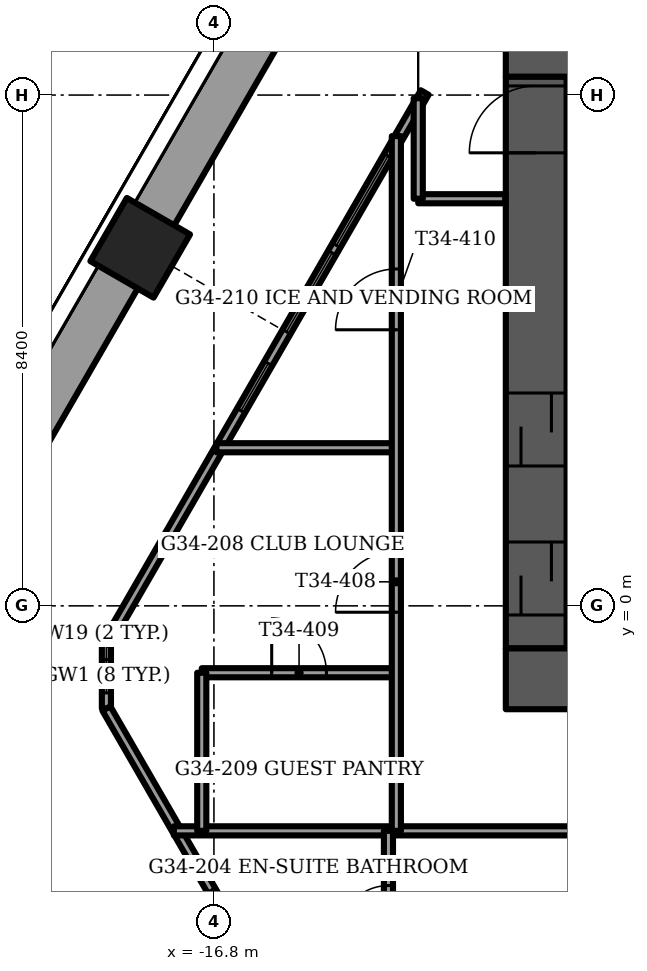
"""IFC4 building model, lengths in metres.
Left out: names, types, materials, properties, quantities, classifications, styles, units other than length and angle.
Written with IfcOpenShell. Run it as: python <this file> out.ifc"""

import sys

from ifc_helpers import new_model, si_unit, direction, frame, frame_2d, origin, origin_2d, place, context, subcontext, project, spatial, rectangle, extrude, element, fill, save


model = new_model("IFC4")
c1 = context("Model", 3, precision=1e-05, world=origin(), true_north=direction((0.0, 1.0)))
c2 = subcontext(c1, "Body", "Model", "MODEL_VIEW")
j1 = project(units=[si_unit("LENGTHUNIT", "METRE"), si_unit("PLANEANGLEUNIT", "RADIAN")], contexts=[c1])
p1 = place(None, origin())
s1 = spatial("IfcSite", under=j1, at=p1, CompositionType="ELEMENT")
p2 = place(p1, origin())
s2 = spatial("IfcBuilding", under=s1, at=p2, CompositionType="ELEMENT")
p3 = place(p2, frame((0.0, 0.0, 138.5)))
s3 = spatial("IfcBuildingStorey", under=s2, at=p3, CompositionType="ELEMENT", Elevation=138.5)
p4 = place(p3, frame((-18.012, 5.888, -1.2), z_axis=(0.0, 0.0, 1.0), x_axis=(0.5, 0.866025403784, 0.0)))
e1 = element("IfcColumn", 1, at=p4, inside=s3, PredefinedType="COLUMN", context=c2, shape_type="SweptSolid", body=[
    extrude(rectangle(XDim=1.2, YDim=1.2, at=origin_2d()), origin(), (0.0, 0.0, 1.0), 3.75),
])
p5 = place(p3, frame((-12.0, -1.2, -0.3), z_axis=(0.0, 0.0, 1.0), x_axis=(1.0, 0.0, 0.0)))
e2 = element("IfcWall", 2, at=p5, inside=s3, PredefinedType="SHEAR", context=c2, shape_type="SweptSolid", body=[
    extrude(rectangle(XDim=24.0, YDim=1.0, at=frame_2d((12.0, 0.0))), origin(), (0.0, 0.0, 1.0), 3.75),
])
p6 = place(p5, frame((11.2, 0.0, 0.0)))
e3 = element("IfcOpeningElement", 3, at=p6, cuts=e2, PredefinedType="OPENING", context=c2, shape_type="SweptSolid", body=[
    extrude(rectangle(XDim=1.6, YDim=2.1, at=frame_2d((0.8, 1.05))), frame((0.0, 0.5, 0.0), z_axis=(0.0, -1.0, 0.0), x_axis=(1.0, 0.0, 0.0)), (0.0, 0.0, 1.0), 1.0),
])
p7 = place(p3, frame((-12.0, 9.2, -0.3), z_axis=(0.0, 0.0, 1.0), x_axis=(1.0, 0.0, 0.0)))
e4 = element("IfcWall", 4, at=p7, inside=s3, PredefinedType="SHEAR", context=c2, shape_type="SweptSolid", body=[
    extrude(rectangle(XDim=24.0, YDim=1.0, at=frame_2d((12.0, 0.0))), origin(), (0.0, 0.0, 1.0), 3.75),
])
p8 = place(p7, frame((11.2, 0.0, 0.0)))
e5 = element("IfcOpeningElement", 5, at=p8, cuts=e4, PredefinedType="OPENING", context=c2, shape_type="SweptSolid", body=[
    extrude(rectangle(XDim=1.6, YDim=2.1, at=frame_2d((0.8, 1.05))), frame((0.0, 0.5, 0.0), z_axis=(0.0, -1.0, 0.0), x_axis=(1.0, 0.0, 0.0)), (0.0, 0.0, 1.0), 1.0),
])
p9 = place(p7, frame((5.25, 0.0, 0.0)))
e6 = element("IfcOpeningElement", 6, at=p9, cuts=e4, PredefinedType="OPENING", context=c2, shape_type="SweptSolid", body=[
    extrude(rectangle(XDim=1.1, YDim=2.1, at=frame_2d((0.55, 1.05))), frame((0.0, 0.5, 0.0), z_axis=(0.0, -1.0, 0.0), x_axis=(1.0, 0.0, 0.0)), (0.0, 0.0, 1.0), 1.0),
])
p10 = place(p7, frame((17.65, 0.0, 0.0)))
e7 = element("IfcOpeningElement", 7, at=p10, cuts=e4, PredefinedType="OPENING", context=c2, shape_type="SweptSolid", body=[
    extrude(rectangle(XDim=1.1, YDim=2.1, at=frame_2d((0.55, 1.05))), frame((0.0, 0.5, 0.0), z_axis=(0.0, -1.0, 0.0), x_axis=(1.0, 0.0, 0.0)), (0.0, 0.0, 1.0), 1.0),
])
p11 = place(p3, frame((-11.5, -0.7, -0.3), z_axis=(0.0, 0.0, 1.0), x_axis=(0.0, 1.0, 0.0)))
e8 = element("IfcWall", 8, at=p11, inside=s3, PredefinedType="SHEAR", context=c2, shape_type="SweptSolid", body=[
    extrude(rectangle(XDim=9.4, YDim=1.0, at=frame_2d((4.7, 0.0))), origin(), (0.0, 0.0, 1.0), 3.75),
])
p12 = place(p11, frame((8.15, 0.0, 0.0)))
e9 = element("IfcOpeningElement", 9, at=p12, cuts=e8, PredefinedType="OPENING", context=c2, shape_type="SweptSolid", body=[
    extrude(rectangle(XDim=1.1, YDim=2.1, at=frame_2d((0.55, 1.05))), frame((0.0, 0.5, 0.0), z_axis=(0.0, -1.0, 0.0), x_axis=(1.0, 0.0, 0.0)), (0.0, 0.0, 1.0), 1.0),
])
p13 = place(p11, frame((0.55, 0.0, 0.0)))
e10 = element("IfcOpeningElement", 10, at=p13, cuts=e8, PredefinedType="OPENING", context=c2, shape_type="SweptSolid", body=[
    extrude(rectangle(XDim=1.2, YDim=2.1, at=frame_2d((0.6, 1.05))), frame((0.0, 0.5, 0.0), z_axis=(0.0, -1.0, 0.0), x_axis=(1.0, 0.0, 0.0)), (0.0, 0.0, 1.0), 1.0),
])
p14 = place(p11, frame((3.0, 0.0, 0.0)))
e11 = element("IfcOpeningElement", 11, at=p14, cuts=e8, PredefinedType="OPENING", context=c2, shape_type="SweptSolid", body=[
    extrude(rectangle(XDim=1.2, YDim=2.1, at=frame_2d((0.6, 1.05))), frame((0.0, 0.5, 0.0), z_axis=(0.0, -1.0, 0.0), x_axis=(1.0, 0.0, 0.0)), (0.0, 0.0, 1.0), 1.0),
])
p15 = place(p3, frame((-14.521, 12.237, 0.0), z_axis=(0.0, 0.0, 1.0), x_axis=(-0.499983182885, -0.866035112932, 0.0)))
e12 = element("IfcWall", 12, at=p15, inside=s3, PredefinedType="PARAPET", context=c2, shape_type="SweptSolid", body=[
    extrude(rectangle(XDim=6.674, YDim=0.9, at=frame_2d((3.337, 0.0))), origin(), (0.0, 0.0, 1.0), 1.1),
])
p16 = place(p3, frame((-18.427, 5.47, 0.0), z_axis=(0.0, 0.0, 1.0), x_axis=(-0.499991127072, -0.866030526511, 0.0)))
e13 = element("IfcWall", 13, at=p16, inside=s3, PredefinedType="PARAPET", context=c2, shape_type="SweptSolid", body=[
    extrude(rectangle(XDim=7.001, YDim=0.9, at=frame_2d((3.5, 0.0))), origin(), (0.0, 0.0, 1.0), 1.1),
])
p17 = place(p3, frame((-21.928, -1.72, 0.0), z_axis=(0.0, 0.0, 1.0), x_axis=(0.500011423449, -0.866018808352, 0.0)))
e14 = element("IfcWall", 14, at=p17, inside=s3, PredefinedType="PARAPET", context=c2, shape_type="SweptSolid", body=[
    extrude(rectangle(XDim=4.998, YDim=0.9, at=frame_2d((2.499, 0.0))), origin(), (0.0, 0.0, 1.0), 1.1),
])
p18 = place(p3, frame((-13.334, 8.442, 0.0), z_axis=(0.0, 0.0, 1.0), x_axis=(-0.499994317138, -0.866028684761, 0.0)))
e15 = element("IfcWall", 15, at=p18, inside=s3, PredefinedType="SOLIDWALL", context=c2, shape_type="SweptSolid", body=[
    extrude(rectangle(XDim=10.468, YDim=0.15, at=frame_2d((5.234, 0.0))), origin(), (0.0, 0.0, 1.0), 3.45),
])
p19 = place(p18, frame((1.204, 0.0, 0.15)))
e16 = element("IfcOpeningElement", 16, at=p19, cuts=e15, PredefinedType="OPENING", context=c2, shape_type="SweptSolid", body=[
    extrude(rectangle(XDim=1.7, YDim=2.2, at=frame_2d((0.85, 1.1))), frame((0.0, 0.075, 0.0), z_axis=(0.0, -1.0, 0.0), x_axis=(1.0, 0.0, 0.0)), (0.0, 0.0, 1.0), 0.15),
])
p20 = place(p18, frame((3.044, 0.0, 0.15)))
e17 = element("IfcOpeningElement", 17, at=p20, cuts=e15, PredefinedType="OPENING", context=c2, shape_type="SweptSolid", body=[
    extrude(rectangle(XDim=1.5, YDim=2.2, at=frame_2d((0.75, 1.1))), frame((0.0, 0.075, 0.0), z_axis=(0.0, -1.0, 0.0), x_axis=(1.0, 0.0, 0.0)), (0.0, 0.0, 1.0), 0.15),
])
p21 = place(p18, frame((5.144, 0.0, 0.15)))
e18 = element("IfcOpeningElement", 18, at=p21, cuts=e15, PredefinedType="OPENING", context=c2, shape_type="SweptSolid", body=[
    extrude(rectangle(XDim=0.9, YDim=2.2, at=frame_2d((0.45, 1.1))), frame((0.0, 0.075, 0.0), z_axis=(0.0, -1.0, 0.0), x_axis=(1.0, 0.0, 0.0)), (0.0, 0.0, 1.0), 0.15),
])
p22 = place(p3, frame((-18.568, -1.689, 0.0), z_axis=(0.0, 0.0, 1.0), x_axis=(0.499994317138, -0.866028684761, 0.0)))
e19 = element("IfcWall", 19, at=p22, inside=s3, PredefinedType="SOLIDWALL", context=c2, shape_type="SweptSolid", body=[
    extrude(rectangle(XDim=10.468, YDim=0.15, at=frame_2d((5.234, 0.0))), origin(), (0.0, 0.0, 1.0), 3.45),
])
p23 = place(p22, frame((3.448, 0.0, 0.15)))
e20 = element("IfcOpeningElement", 20, at=p23, cuts=e19, PredefinedType="OPENING", context=c2, shape_type="SweptSolid", body=[
    extrude(rectangle(XDim=1.5, YDim=2.2, at=frame_2d((0.75, 1.1))), frame((0.0, 0.075, 0.0), z_axis=(0.0, -1.0, 0.0), x_axis=(1.0, 0.0, 0.0)), (0.0, 0.0, 1.0), 0.15),
])
p24 = place(p22, frame((6.021, 0.0, 0.15)))
e21 = element("IfcOpeningElement", 21, at=p24, cuts=e19, PredefinedType="OPENING", context=c2, shape_type="SweptSolid", body=[
    extrude(rectangle(XDim=1.7, YDim=2.2, at=frame_2d((0.85, 1.1))), frame((0.0, 0.075, 0.0), z_axis=(0.0, -1.0, 0.0), x_axis=(1.0, 0.0, 0.0)), (0.0, 0.0, 1.0), 0.15),
])
p25 = place(p3, frame((-18.568, -0.624, 0.0), z_axis=(0.0, 0.0, 1.0), x_axis=(0.0, -1.0, 0.0)))
e22 = element("IfcWall", 22, at=p25, inside=s3, PredefinedType="SOLIDWALL", context=c2, shape_type="SweptSolid", body=[
    extrude(rectangle(XDim=1.065, YDim=0.15, at=frame_2d((0.532, 0.0))), origin(), (0.0, 0.0, 1.0), 3.45),
])
p26 = place(p25, frame((0.258, 0.0, 0.15)))
e23 = element("IfcOpeningElement", 23, at=p26, cuts=e22, PredefinedType="OPENING", context=c2, shape_type="SweptSolid", body=[
    extrude(rectangle(XDim=0.55, YDim=2.2, at=frame_2d((0.275, 1.1))), frame((0.0, 0.075, 0.0), z_axis=(0.0, -1.0, 0.0), x_axis=(1.0, 0.0, 0.0)), (0.0, 0.0, 1.0), 0.15),
])
p27 = place(p3, frame((-17.459, -3.7, 0.0), z_axis=(0.0, 0.0, 1.0), x_axis=(1.0, 0.0, 0.0)))
e24 = element("IfcWall", 24, at=p27, inside=s3, PredefinedType="PARTITIONING", context=c2, shape_type="SweptSolid", body=[
    extrude(rectangle(XDim=8.299, YDim=0.15, at=frame_2d((4.149, 0.0))), origin(), (0.0, 0.0, 1.0), 3.45),
])
p28 = place(p27, frame((7.059, 0.0, 0.0)))
e25 = element("IfcOpeningElement", 25, at=p28, cuts=e24, PredefinedType="OPENING", context=c2, shape_type="SweptSolid", body=[
    extrude(rectangle(XDim=1.0, YDim=2.1, at=frame_2d((0.5, 1.05))), frame((0.0, 0.075, 0.0), z_axis=(0.0, -1.0, 0.0), x_axis=(1.0, 0.0, 0.0)), (0.0, 0.0, 1.0), 0.15),
])
p29 = place(p3, frame((-17.0, -1.1, 0.0), z_axis=(0.0, 0.0, 1.0), x_axis=(1.0, 0.0, 0.0)))
e26 = element("IfcWall", 26, at=p29, inside=s3, PredefinedType="PARTITIONING", context=c2, shape_type="SweptSolid", body=[
    extrude(rectangle(XDim=3.2, YDim=0.15, at=frame_2d((1.6, 0.0))), origin(), (0.0, 0.0, 1.0), 3.45),
])
p30 = place(p29, frame((1.15, 0.0, 0.0)))
e27 = element("IfcOpeningElement", 27, at=p30, cuts=e26, PredefinedType="OPENING", context=c2, shape_type="SweptSolid", body=[
    extrude(rectangle(XDim=0.9, YDim=2.1, at=frame_2d((0.45, 1.05))), frame((0.0, 0.075, 0.0), z_axis=(0.0, -1.0, 0.0), x_axis=(1.0, 0.0, 0.0)), (0.0, 0.0, 1.0), 0.15),
])
p31 = place(p3, frame((-16.759, 2.6, 0.0), z_axis=(0.0, 0.0, 1.0), x_axis=(1.0, 0.0, 0.0)))
e28 = element("IfcWall", 28, at=p31, inside=s3, PredefinedType="PARTITIONING", context=c2, shape_type="SweptSolid", body=[
    extrude(rectangle(XDim=2.959, YDim=0.15, at=frame_2d((1.479, 0.0))), origin(), (0.0, 0.0, 1.0), 3.45),
])
p32 = place(p3, frame((-13.44, 6.695, 0.0), z_axis=(0.0, 0.0, 1.0), x_axis=(1.0, 0.0, 0.0)))
e29 = element("IfcWall", 29, at=p32, inside=s3, PredefinedType="PARTITIONING", context=c2, shape_type="SweptSolid", body=[
    extrude(rectangle(XDim=1.43, YDim=0.15, at=frame_2d((0.715, 0.0))), origin(), (0.0, 0.0, 1.0), 3.45),
])
p33 = place(p3, frame((-13.44, 6.695, 0.0), z_axis=(0.0, 0.0, 1.0), x_axis=(0.0, 1.0, 0.0)))
e30 = element("IfcWall", 30, at=p33, inside=s3, PredefinedType="PARTITIONING", context=c2, shape_type="SweptSolid", body=[
    extrude(rectangle(XDim=1.653, YDim=0.15, at=frame_2d((0.826, 0.0))), origin(), (0.0, 0.0, 1.0), 3.45),
])
p34 = place(p3, frame((-13.8, -3.7, 0.0), z_axis=(0.0, 0.0, 1.0), x_axis=(0.0, 1.0, 0.0)))
e31 = element("IfcWall", 31, at=p34, inside=s3, PredefinedType="PARTITIONING", context=c2, shape_type="SweptSolid", body=[
    extrude(rectangle(XDim=11.425, YDim=0.15, at=frame_2d((5.712, 0.0))), origin(), (0.0, 0.0, 1.0), 3.45),
])
p35 = place(p34, frame((3.595, 0.0, 0.0)))
e32 = element("IfcOpeningElement", 32, at=p35, cuts=e31, PredefinedType="OPENING", context=c2, shape_type="SweptSolid", body=[
    extrude(rectangle(XDim=1.0, YDim=2.1, at=frame_2d((0.5, 1.05))), frame((0.0, 0.075, 0.0), z_axis=(0.0, -1.0, 0.0), x_axis=(1.0, 0.0, 0.0)), (0.0, 0.0, 1.0), 0.15),
])
p36 = place(p34, frame((8.24, 0.0, 0.0)))
e33 = element("IfcOpeningElement", 33, at=p36, cuts=e31, PredefinedType="OPENING", context=c2, shape_type="SweptSolid", body=[
    extrude(rectangle(XDim=1.0, YDim=2.1, at=frame_2d((0.5, 1.05))), frame((0.0, 0.075, 0.0), z_axis=(0.0, -1.0, 0.0), x_axis=(1.0, 0.0, 0.0)), (0.0, 0.0, 1.0), 0.15),
])
p37 = place(p3, frame((-13.93, -6.3, 0.0), z_axis=(0.0, 0.0, 1.0), x_axis=(0.0, 1.0, 0.0)))
e34 = element("IfcWall", 34, at=p37, inside=s3, PredefinedType="PARTITIONING", context=c2, shape_type="SweptSolid", body=[
    extrude(rectangle(XDim=2.6, YDim=0.15, at=frame_2d((1.3, 0.0))), origin(), (0.0, 0.0, 1.0), 3.45),
])
p38 = place(p37, frame((0.9, 0.0, 0.0)))
e35 = element("IfcOpeningElement", 35, at=p38, cuts=e34, PredefinedType="OPENING", context=c2, shape_type="SweptSolid", body=[
    extrude(rectangle(XDim=0.8, YDim=2.1, at=frame_2d((0.4, 1.05))), frame((0.0, 0.075, 0.0), z_axis=(0.0, -1.0, 0.0), x_axis=(1.0, 0.0, 0.0)), (0.0, 0.0, 1.0), 0.15),
])
p39 = place(p3, frame((-17.0, -3.7, 0.0), z_axis=(0.0, 0.0, 1.0), x_axis=(0.0, 1.0, 0.0)))
e36 = element("IfcWall", 36, at=p39, inside=s3, PredefinedType="PARTITIONING", context=c2, shape_type="SweptSolid", body=[
    extrude(rectangle(XDim=2.6, YDim=0.15, at=frame_2d((1.3, 0.0))), origin(), (0.0, 0.0, 1.0), 3.45),
])
p40 = place(p19, origin())
e37 = element("IfcWindow", 37, at=p40, inside=s3, PartitioningType="SINGLE_PANEL", PredefinedType="WINDOW", context=c2, shape_type="SweptSolid", body=[
    extrude(rectangle(XDim=1.7, YDim=2.2, at=frame_2d((0.85, 1.1))), frame((0.0, 0.03, 0.0), z_axis=(0.0, -1.0, 0.0), x_axis=(1.0, 0.0, 0.0)), (0.0, 0.0, 1.0), 0.06),
])
fill(e16, e37)
p41 = place(p20, origin())
e38 = element("IfcWindow", 38, at=p41, inside=s3, PartitioningType="SINGLE_PANEL", PredefinedType="WINDOW", context=c2, shape_type="SweptSolid", body=[
    extrude(rectangle(XDim=1.5, YDim=2.2, at=frame_2d((0.75, 1.1))), frame((0.0, 0.03, 0.0), z_axis=(0.0, -1.0, 0.0), x_axis=(1.0, 0.0, 0.0)), (0.0, 0.0, 1.0), 0.06),
])
fill(e17, e38)
p42 = place(p21, origin())
e39 = element("IfcWindow", 39, at=p42, inside=s3, PartitioningType="SINGLE_PANEL", PredefinedType="WINDOW", context=c2, shape_type="SweptSolid", body=[
    extrude(rectangle(XDim=0.9, YDim=2.2, at=frame_2d((0.45, 1.1))), frame((0.0, 0.03, 0.0), z_axis=(0.0, -1.0, 0.0), x_axis=(1.0, 0.0, 0.0)), (0.0, 0.0, 1.0), 0.06),
])
fill(e18, e39)
p43 = place(p23, origin())
e40 = element("IfcWindow", 40, at=p43, inside=s3, PartitioningType="SINGLE_PANEL", PredefinedType="WINDOW", context=c2, shape_type="SweptSolid", body=[
    extrude(rectangle(XDim=1.5, YDim=2.2, at=frame_2d((0.75, 1.1))), frame((0.0, 0.03, 0.0), z_axis=(0.0, -1.0, 0.0), x_axis=(1.0, 0.0, 0.0)), (0.0, 0.0, 1.0), 0.06),
])
fill(e20, e40)
p44 = place(p26, origin())
e41 = element("IfcWindow", 41, at=p44, inside=s3, PartitioningType="SINGLE_PANEL", PredefinedType="WINDOW", context=c2, shape_type="SweptSolid", body=[
    extrude(rectangle(XDim=0.55, YDim=2.2, at=frame_2d((0.275, 1.1))), frame((0.0, 0.03, 0.0), z_axis=(0.0, -1.0, 0.0), x_axis=(1.0, 0.0, 0.0)), (0.0, 0.0, 1.0), 0.06),
])
fill(e23, e41)
p45 = place(p12, origin())
e42 = element("IfcDoor", 42, at=p45, inside=s3, OperationType="SINGLE_SWING_LEFT", PredefinedType="DOOR", context=c2, shape_type="SweptSolid", body=[
    extrude(rectangle(XDim=1.1, YDim=2.1, at=frame_2d((0.55, 1.05))), frame((0.0, 0.025, 0.0), z_axis=(0.0, -1.0, 0.0), x_axis=(1.0, 0.0, 0.0)), (0.0, 0.0, 1.0), 0.05),
])
fill(e9, e42)
p46 = place(p13, origin())
e43 = element("IfcDoor", 43, at=p46, inside=s3, OperationType="SLIDING_TO_LEFT", PredefinedType="DOOR", context=c2, shape_type="SweptSolid", body=[
    extrude(rectangle(XDim=1.2, YDim=2.1, at=frame_2d((0.6, 1.05))), frame((0.0, 0.025, 0.0), z_axis=(0.0, -1.0, 0.0), x_axis=(1.0, 0.0, 0.0)), (0.0, 0.0, 1.0), 0.05),
])
fill(e10, e43)
p47 = place(p14, origin())
e44 = element("IfcDoor", 44, at=p47, inside=s3, OperationType="SLIDING_TO_LEFT", PredefinedType="DOOR", context=c2, shape_type="SweptSolid", body=[
    extrude(rectangle(XDim=1.2, YDim=2.1, at=frame_2d((0.6, 1.05))), frame((0.0, 0.025, 0.0), z_axis=(0.0, -1.0, 0.0), x_axis=(1.0, 0.0, 0.0)), (0.0, 0.0, 1.0), 0.05),
])
fill(e11, e44)
p48 = place(p38, origin())
e45 = element("IfcDoor", 45, at=p48, inside=s3, OperationType="SINGLE_SWING_RIGHT", PredefinedType="DOOR", context=c2, shape_type="SweptSolid", body=[
    extrude(rectangle(XDim=0.8, YDim=2.1, at=frame_2d((0.4, 1.05))), frame((0.0, 0.025, 0.0), z_axis=(0.0, -1.0, 0.0), x_axis=(1.0, 0.0, 0.0)), (0.0, 0.0, 1.0), 0.05),
])
fill(e35, e45)
p49 = place(p35, origin())
e46 = element("IfcDoor", 46, at=p49, inside=s3, OperationType="SINGLE_SWING_RIGHT", PredefinedType="DOOR", context=c2, shape_type="SweptSolid", body=[
    extrude(rectangle(XDim=1.0, YDim=2.1, at=frame_2d((0.5, 1.05))), frame((0.0, 0.025, 0.0), z_axis=(0.0, -1.0, 0.0), x_axis=(1.0, 0.0, 0.0)), (0.0, 0.0, 1.0), 0.05),
])
fill(e32, e46)
p50 = place(p30, origin())
e47 = element("IfcDoor", 47, at=p50, inside=s3, OperationType="SINGLE_SWING_RIGHT", PredefinedType="DOOR", context=c2, shape_type="SweptSolid", body=[
    extrude(rectangle(XDim=0.9, YDim=2.1, at=frame_2d((0.45, 1.05))), frame((0.0, 0.025, 0.0), z_axis=(0.0, -1.0, 0.0), x_axis=(1.0, 0.0, 0.0)), (0.0, 0.0, 1.0), 0.05),
])
fill(e27, e47)
p51 = place(p36, origin())
e48 = element("IfcDoor", 48, at=p51, inside=s3, OperationType="SINGLE_SWING_LEFT", PredefinedType="DOOR", context=c2, shape_type="SweptSolid", body=[
    extrude(rectangle(XDim=1.0, YDim=2.1, at=frame_2d((0.5, 1.05))), frame((0.0, 0.025, 0.0), z_axis=(0.0, -1.0, 0.0), x_axis=(1.0, 0.0, 0.0)), (0.0, 0.0, 1.0), 0.05),
])
fill(e33, e48)
save(model, sys.argv[1])
